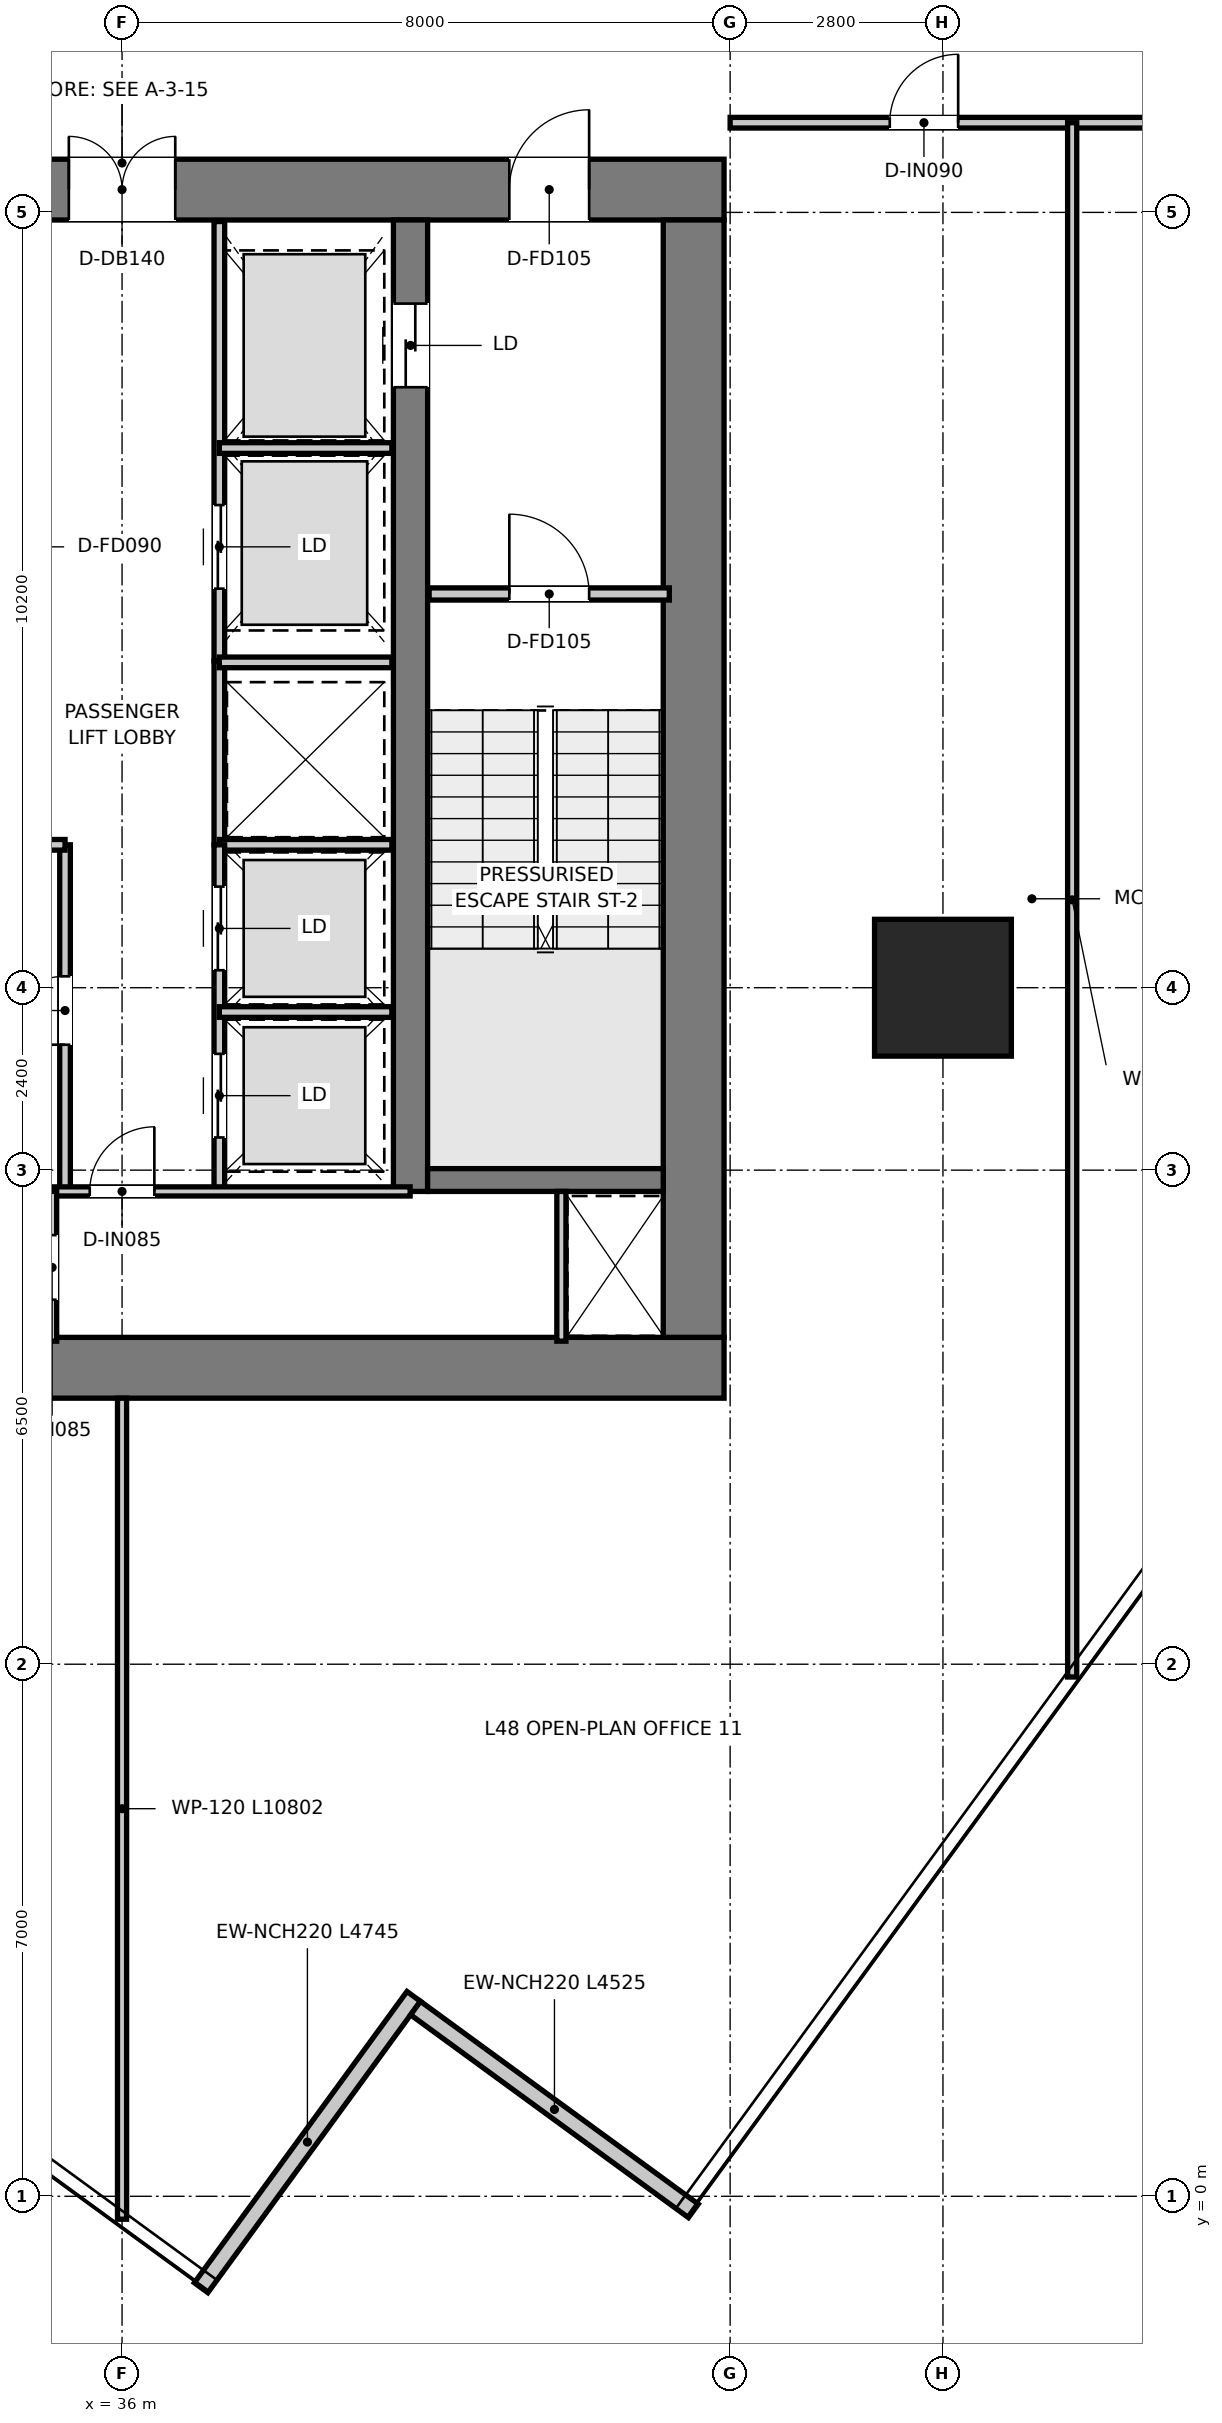
"""IFC4 building model, lengths in metres.
Left out: names, types, materials, properties, quantities, classifications, styles, units other than length and angle.
Written with IfcOpenShell. Run it as: python <this file> out.ifc"""

import sys

from ifc_helpers import new_model, si_unit, direction, frame, frame_2d, origin, origin_2d, place, context, subcontext, project, spatial, rectangle, extrude, source, transform, mapped, element, fill, save


model = new_model("IFC4")
c1 = context("Model", 3, precision=1e-05, world=origin(), true_north=direction((0.0, 1.0)))
c2 = subcontext(c1, "Body", "Model", "MODEL_VIEW")
j1 = project(units=[si_unit("LENGTHUNIT", "METRE"), si_unit("PLANEANGLEUNIT", "RADIAN")], contexts=[c1])
p1 = place(None, origin())
s1 = spatial("IfcSite", under=j1, at=p1, CompositionType="ELEMENT")
p2 = place(p1, origin())
s2 = spatial("IfcBuilding", under=s1, at=p2, CompositionType="ELEMENT")
p3 = place(p2, frame((0.0, 0.0, 197.55)))
s3 = spatial("IfcBuildingStorey", under=s2, at=p3, CompositionType="ELEMENT", Elevation=197.55)
p4 = place(p3, frame((28.08, 10.9, 0.0), z_axis=(0.0, 0.0, 1.0), x_axis=(1.0, 0.0, 0.0)))
e1 = element("IfcWall", 1, at=p4, inside=s3, PredefinedType="SHEAR", context=c2, shape_type="SweptSolid", body=[
    extrude(rectangle(XDim=15.84, YDim=0.8, at=frame_2d((7.92, 0.0))), origin(), (0.0, 0.0, 1.0), 3.95),
])
p5 = place(p3, frame((28.08, 26.4, 0.0), z_axis=(0.0, 0.0, 1.0), x_axis=(1.0, 0.0, 0.0)))
e2 = element("IfcWall", 2, at=p5, inside=s3, PredefinedType="SHEAR", context=c2, shape_type="SweptSolid", body=[
    extrude(rectangle(XDim=15.84, YDim=0.8, at=frame_2d((7.92, 0.0))), origin(), (0.0, 0.0, 1.0), 3.95),
])
p6 = place(p5, frame((7.22, 0.0, 0.0)))
e3 = element("IfcOpeningElement", 3, at=p6, cuts=e2, PredefinedType="OPENING", context=c2, shape_type="SweptSolid", body=[
    extrude(rectangle(XDim=1.4, YDim=2.2, at=frame_2d((0.7, 1.1))), frame((0.0, 0.41, 0.0), z_axis=(0.0, -1.0, 0.0), x_axis=(1.0, 0.0, 0.0)), (0.0, 0.0, 1.0), 0.82),
])
p7 = place(p5, frame((1.775, 0.0, 0.0)))
e4 = element("IfcOpeningElement", 4, at=p7, cuts=e2, PredefinedType="OPENING", context=c2, shape_type="SweptSolid", body=[
    extrude(rectangle(XDim=1.05, YDim=2.1, at=frame_2d((0.525, 1.05))), frame((0.0, 0.41, 0.0), z_axis=(0.0, -1.0, 0.0), x_axis=(1.0, 0.0, 0.0)), (0.0, 0.0, 1.0), 0.82),
])
p8 = place(p5, frame((13.015, 0.0, 0.0)))
e5 = element("IfcOpeningElement", 5, at=p8, cuts=e2, PredefinedType="OPENING", context=c2, shape_type="SweptSolid", body=[
    extrude(rectangle(XDim=1.05, YDim=2.1, at=frame_2d((0.525, 1.05))), frame((0.0, 0.41, 0.0), z_axis=(0.0, -1.0, 0.0), x_axis=(1.0, 0.0, 0.0)), (0.0, 0.0, 1.0), 0.82),
])
p9 = place(p3, frame((43.52, 11.3, 0.0), z_axis=(0.0, 0.0, 1.0), x_axis=(0.0, 1.0, 0.0)))
e6 = element("IfcWall", 6, at=p9, inside=s3, PredefinedType="SHEAR", context=c2, shape_type="SweptSolid", body=[
    extrude(rectangle(XDim=14.7, YDim=0.8, at=frame_2d((7.35, 0.0))), origin(), (0.0, 0.0, 1.0), 3.95),
])
p10 = place(p3, frame((39.795, 13.22, 0.0), z_axis=(0.0, 0.0, 1.0), x_axis=(0.0, 1.0, 0.0)))
e7 = element("IfcWall", 7, at=p10, inside=s3, PredefinedType="SHEAR", context=c2, shape_type="SweptSolid", body=[
    extrude(rectangle(XDim=12.78, YDim=0.45, at=frame_2d((6.39, 0.0))), origin(), (0.0, 0.0, 1.0), 3.95),
])
p11 = place(p10, frame((10.58, 0.0, 0.0)))
e8 = element("IfcOpeningElement", 8, at=p11, cuts=e7, PredefinedType="OPENING", context=c2, shape_type="SweptSolid", body=[
    extrude(rectangle(XDim=1.1, YDim=2.15, at=frame_2d((0.55, 1.075))), frame((0.0, 0.235, 0.0), z_axis=(0.0, -1.0, 0.0), x_axis=(1.0, 0.0, 0.0)), (0.0, 0.0, 1.0), 0.47),
])
p12 = place(p3, frame((40.02, 13.37, 0.0), z_axis=(0.0, 0.0, 1.0), x_axis=(1.0, 0.0, 0.0)))
e9 = element("IfcWall", 9, at=p12, inside=s3, PredefinedType="SHEAR", context=c2, shape_type="SweptSolid", body=[
    extrude(rectangle(XDim=3.1, YDim=0.3, at=frame_2d((1.55, 0.0))), origin(), (0.0, 0.0, 1.0), 3.95),
])
m1 = source(origin(), c2, "Body", "SweptSolid", [
    extrude(rectangle(XDim=1.8, YDim=1.8, at=origin_2d()), origin(), (0.0, 0.0, 1.0), 3.95),
])
p13 = place(p3, frame((46.8, 15.9, 0.0), z_axis=(0.0, 0.0, 1.0), x_axis=(1.0, 0.0, 0.0)))
e10 = element("IfcColumn", 10, at=p13, inside=s3, PredefinedType="USERDEFINED", context=c2, shape_type="MappedRepresentation", body=[
    mapped(m1, transform((0.0, 0.0, 0.0), x_axis=(1.0, 0.0, 0.0), y_axis=(0.0, 1.0, 0.0), z_axis=(0.0, 0.0, 1.0), scale=1.0)),
])
p14 = place(p3, frame((37.04, -1.203, 0.0), z_axis=(0.0, 0.0, 1.0), x_axis=(0.589535308044, 0.807742607871, 0.0)))
e11 = element("IfcWall", 11, at=p14, inside=s3, PredefinedType="ELEMENTEDWALL", context=c2, shape_type="SweptSolid", body=[
    extrude(rectangle(XDim=4.745, YDim=0.22, at=frame_2d((2.373, 0.0))), origin(), (0.0, 0.0, 1.0), 3.59),
])
p15 = place(p3, frame((39.861, 2.476, 0.0), z_axis=(0.0, 0.0, 1.0), x_axis=(0.807734007732, -0.589547091209, 0.0)))
e12 = element("IfcWall", 12, at=p15, inside=s3, PredefinedType="ELEMENTEDWALL", context=c2, shape_type="SweptSolid", body=[
    extrude(rectangle(XDim=4.525, YDim=0.22, at=frame_2d((2.263, 0.0))), origin(), (0.0, 0.0, 1.0), 3.59),
])
p16 = place(p3, frame((40.04, 21.08, 0.0), z_axis=(0.0, 0.0, 1.0), x_axis=(1.0, 0.0, 0.0)))
e13 = element("IfcWall", 13, at=p16, inside=s3, PredefinedType="PARTITIONING", context=c2, shape_type="SweptSolid", body=[
    extrude(rectangle(XDim=3.16, YDim=0.16, at=frame_2d((1.58, 0.0))), origin(), (0.0, 0.0, 1.0), 3.59),
])
p17 = place(p16, frame((1.055, 0.0, 0.0)))
e14 = element("IfcOpeningElement", 14, at=p17, cuts=e13, PredefinedType="OPENING", context=c2, shape_type="SweptSolid", body=[
    extrude(rectangle(XDim=1.05, YDim=2.1, at=frame_2d((0.525, 1.05))), frame((0.0, 0.09, 0.0), z_axis=(0.0, -1.0, 0.0), x_axis=(1.0, 0.0, 0.0)), (0.0, 0.0, 1.0), 0.18),
])
p18 = place(p3, frame((37.28, 20.2, 0.0), z_axis=(0.0, 0.0, 1.0), x_axis=(0.0, 1.0, 0.0)))
e15 = element("IfcWall", 15, at=p18, inside=s3, PredefinedType="PARTITIONING", context=c2, shape_type="SweptSolid", body=[
    extrude(rectangle(XDim=5.78, YDim=0.14, at=frame_2d((2.89, 0.0))), origin(), (0.0, 0.0, 1.0), 2.59),
])
p19 = place(p18, frame((0.95, 0.0, 0.0)))
e16 = element("IfcOpeningElement", 16, at=p19, cuts=e15, PredefinedType="OPENING", context=c2, shape_type="SweptSolid", body=[
    extrude(rectangle(XDim=1.1, YDim=2.15, at=frame_2d((0.55, 1.075))), frame((0.0, 0.08, 0.0), z_axis=(0.0, -1.0, 0.0), x_axis=(1.0, 0.0, 0.0)), (0.0, 0.0, 1.0), 0.16),
])
p20 = place(p3, frame((37.28, 23.0, 0.0), z_axis=(0.0, 0.0, 1.0), x_axis=(1.0, 0.0, 0.0)))
e17 = element("IfcWall", 17, at=p20, inside=s3, PredefinedType="PARTITIONING", context=c2, shape_type="SweptSolid", body=[
    extrude(rectangle(XDim=2.27, YDim=0.14, at=frame_2d((1.135, 0.0))), origin(), (0.0, 0.0, 1.0), 2.59),
])
p21 = place(p3, frame((37.28, 17.78, 0.0), z_axis=(0.0, 0.0, 1.0), x_axis=(0.0, 1.0, 0.0)))
e18 = element("IfcWall", 18, at=p21, inside=s3, PredefinedType="PARTITIONING", context=c2, shape_type="SweptSolid", body=[
    extrude(rectangle(XDim=2.42, YDim=0.14, at=frame_2d((1.21, 0.0))), origin(), (0.0, 0.0, 1.0), 3.59),
])
for number, where, z_axis, x_axis in (
    (19, (37.28, 17.78, 0.0), (0.0, 0.0, 1.0), (1.0, 0.0, 0.0)),
    (20, (37.28, 20.18, 0.0), (0.0, 0.0, 1.0), (1.0, 0.0, 0.0)),
):
    element("IfcWall", number, at=place(p3, frame(where, z_axis=z_axis, x_axis=x_axis)), inside=s3, PredefinedType="PARTITIONING", context=c2, shape_type="SweptSolid", body=[
        extrude(rectangle(XDim=2.27, YDim=0.14, at=frame_2d((1.135, 0.0))), origin(), (0.0, 0.0, 1.0), 3.59),
    ])
p22 = place(p3, frame((35.25, 13.22, 0.0), z_axis=(0.0, 0.0, 1.0), x_axis=(0.0, 1.0, 0.0)))
e21 = element("IfcWall", 21, at=p22, inside=s3, PredefinedType="PARTITIONING", context=c2, shape_type="SweptSolid", body=[
    extrude(rectangle(XDim=4.56, YDim=0.14, at=frame_2d((2.28, 0.0))), origin(), (0.0, 0.0, 1.0), 3.59),
])
p23 = place(p22, frame((1.93, 0.0, 0.0)))
e22 = element("IfcOpeningElement", 22, at=p23, cuts=e21, PredefinedType="OPENING", context=c2, shape_type="SweptSolid", body=[
    extrude(rectangle(XDim=0.9, YDim=2.1, at=frame_2d((0.45, 1.05))), frame((0.0, 0.08, 0.0), z_axis=(0.0, -1.0, 0.0), x_axis=(1.0, 0.0, 0.0)), (0.0, 0.0, 1.0), 0.16),
])
p24 = place(p3, frame((34.72, 17.78, 0.0), z_axis=(0.0, 0.0, 1.0), x_axis=(1.0, 0.0, 0.0)))
e23 = element("IfcWall", 23, at=p24, inside=s3, PredefinedType="PARTITIONING", context=c2, shape_type="SweptSolid", body=[
    extrude(rectangle(XDim=0.53, YDim=0.14, at=frame_2d((0.265, 0.0))), origin(), (0.0, 0.0, 1.0), 3.59),
])
p25 = place(p3, frame((37.28, 13.22, 0.0), z_axis=(0.0, 0.0, 1.0), x_axis=(0.0, 1.0, 0.0)))
e24 = element("IfcWall", 24, at=p25, inside=s3, PredefinedType="PARTITIONING", context=c2, shape_type="SweptSolid", body=[
    extrude(rectangle(XDim=4.56, YDim=0.14, at=frame_2d((2.28, 0.0))), origin(), (0.0, 0.0, 1.0), 3.59),
])
p26 = place(p25, frame((0.71, 0.0, 0.0)))
e25 = element("IfcOpeningElement", 25, at=p26, cuts=e24, PredefinedType="OPENING", context=c2, shape_type="SweptSolid", body=[
    extrude(rectangle(XDim=1.1, YDim=2.15, at=frame_2d((0.55, 1.075))), frame((0.0, 0.08, 0.0), z_axis=(0.0, -1.0, 0.0), x_axis=(1.0, 0.0, 0.0)), (0.0, 0.0, 1.0), 0.16),
])
p27 = place(p25, frame((2.91, 0.0, 0.0)))
e26 = element("IfcOpeningElement", 26, at=p27, cuts=e24, PredefinedType="OPENING", context=c2, shape_type="SweptSolid", body=[
    extrude(rectangle(XDim=1.1, YDim=2.15, at=frame_2d((0.55, 1.075))), frame((0.0, 0.08, 0.0), z_axis=(0.0, -1.0, 0.0), x_axis=(1.0, 0.0, 0.0)), (0.0, 0.0, 1.0), 0.16),
])
p28 = place(p3, frame((37.28, 15.58, 0.0), z_axis=(0.0, 0.0, 1.0), x_axis=(1.0, 0.0, 0.0)))
e27 = element("IfcWall", 27, at=p28, inside=s3, PredefinedType="PARTITIONING", context=c2, shape_type="SweptSolid", body=[
    extrude(rectangle(XDim=2.27, YDim=0.14, at=frame_2d((1.135, 0.0))), origin(), (0.0, 0.0, 1.0), 3.59),
])
p29 = place(p3, frame((41.78, 11.25, 0.0), z_axis=(0.0, 0.0, 1.0), x_axis=(0.0, 1.0, 0.0)))
e28 = element("IfcWall", 28, at=p29, inside=s3, PredefinedType="PARTITIONING", context=c2, shape_type="SweptSolid", body=[
    extrude(rectangle(XDim=1.97, YDim=0.12, at=frame_2d((0.985, 0.0))), origin(), (0.0, 0.0, 1.0), 3.59),
])
p30 = place(p3, frame((32.21, 13.22, 0.0), z_axis=(0.0, 0.0, 1.0), x_axis=(1.0, 0.0, 0.0)))
e29 = element("IfcWall", 29, at=p30, inside=s3, PredefinedType="PARTITIONING", context=c2, shape_type="SweptSolid", body=[
    extrude(rectangle(XDim=7.58, YDim=0.12, at=frame_2d((3.79, 0.0))), origin(), (0.0, 0.0, 1.0), 3.59),
])
p31 = place(p30, frame((3.365, 0.0, 0.0)))
e30 = element("IfcOpeningElement", 30, at=p31, cuts=e29, PredefinedType="OPENING", context=c2, shape_type="SweptSolid", body=[
    extrude(rectangle(XDim=0.85, YDim=2.1, at=frame_2d((0.425, 1.05))), frame((0.0, 0.07, 0.0), z_axis=(0.0, -1.0, 0.0), x_axis=(1.0, 0.0, 0.0)), (0.0, 0.0, 1.0), 0.14),
])
p32 = place(p3, frame((35.08, 11.25, 0.0), z_axis=(0.0, 0.0, 1.0), x_axis=(0.0, 1.0, 0.0)))
e31 = element("IfcWall", 31, at=p32, inside=s3, PredefinedType="PARTITIONING", context=c2, shape_type="SweptSolid", body=[
    extrude(rectangle(XDim=1.97, YDim=0.12, at=frame_2d((0.985, 0.0))), origin(), (0.0, 0.0, 1.0), 3.59),
])
p33 = place(p32, frame((0.545, 0.0, 0.0)))
e32 = element("IfcOpeningElement", 32, at=p33, cuts=e31, PredefinedType="OPENING", context=c2, shape_type="SweptSolid", body=[
    extrude(rectangle(XDim=0.85, YDim=2.1, at=frame_2d((0.425, 1.05))), frame((0.0, 0.07, 0.0), z_axis=(0.0, -1.0, 0.0), x_axis=(1.0, 0.0, 0.0)), (0.0, 0.0, 1.0), 0.14),
])
p34 = place(p3, frame((44.0, 27.28, 0.0), z_axis=(0.0, 0.0, 1.0), x_axis=(1.0, 0.0, 0.0)))
e33 = element("IfcWall", 33, at=p34, inside=s3, PredefinedType="PARTITIONING", context=c2, shape_type="SweptSolid", body=[
    extrude(rectangle(XDim=19.425, YDim=0.14, at=frame_2d((9.712, 0.0))), origin(), (0.0, 0.0, 1.0), 2.95),
])
p35 = place(p34, frame((2.1, 0.0, 0.0)))
e34 = element("IfcOpeningElement", 34, at=p35, cuts=e33, PredefinedType="OPENING", context=c2, shape_type="SweptSolid", body=[
    extrude(rectangle(XDim=0.9, YDim=2.1, at=frame_2d((0.45, 1.05))), frame((0.0, 0.08, 0.0), z_axis=(0.0, -1.0, 0.0), x_axis=(1.0, 0.0, 0.0)), (0.0, 0.0, 1.0), 0.16),
])
p36 = place(p34, frame((11.22, 0.0, 0.0)))
e35 = element("IfcOpeningElement", 35, at=p36, cuts=e33, PredefinedType="OPENING", context=c2, shape_type="SweptSolid", body=[
    extrude(rectangle(XDim=0.9, YDim=2.1, at=frame_2d((0.45, 1.05))), frame((0.0, 0.08, 0.0), z_axis=(0.0, -1.0, 0.0), x_axis=(1.0, 0.0, 0.0)), (0.0, 0.0, 1.0), 0.16),
])
p37 = place(p3, frame((36.0, -0.302, 0.0), z_axis=(0.0, 0.0, 1.0), x_axis=(0.0, 1.0, 0.0)))
e36 = element("IfcWall", 36, at=p37, inside=s3, PredefinedType="PARTITIONING", context=c2, shape_type="SweptSolid", body=[
    extrude(rectangle(XDim=10.802, YDim=0.12, at=frame_2d((5.401, 0.0))), origin(), (0.0, 0.0, 1.0), 3.59),
])
p38 = place(p3, frame((48.5, 6.832, 0.0), z_axis=(0.0, 0.0, 1.0), x_axis=(0.0, 1.0, 0.0)))
e37 = element("IfcWall", 37, at=p38, inside=s3, PredefinedType="PARTITIONING", context=c2, shape_type="SweptSolid", body=[
    extrude(rectangle(XDim=20.448, YDim=0.12, at=frame_2d((10.224, 0.0))), origin(), (0.0, 0.0, 1.0), 3.0),
])
p39 = place(p17, origin())
e38 = element("IfcDoor", 38, at=p39, inside=s3, OperationType="SINGLE_SWING_LEFT", PredefinedType="DOOR", context=c2, shape_type="SweptSolid", body=[
    extrude(rectangle(XDim=1.05, YDim=2.1, at=frame_2d((0.525, 1.05))), frame((0.0, 0.025, 0.0), z_axis=(0.0, -1.0, 0.0), x_axis=(1.0, 0.0, 0.0)), (0.0, 0.0, 1.0), 0.05),
])
fill(e14, e38)
p40 = place(p6, origin())
e39 = element("IfcDoor", 39, at=p40, inside=s3, OperationType="DOUBLE_DOOR_SINGLE_SWING", PredefinedType="DOOR", context=c2, shape_type="SweptSolid", body=[
    extrude(rectangle(XDim=1.4, YDim=2.2, at=frame_2d((0.7, 1.1))), frame((0.0, 0.025, 0.0), z_axis=(0.0, -1.0, 0.0), x_axis=(1.0, 0.0, 0.0)), (0.0, 0.0, 1.0), 0.05),
])
fill(e3, e39)
p41 = place(p8, origin())
e40 = element("IfcDoor", 40, at=p41, inside=s3, OperationType="SINGLE_SWING_RIGHT", PredefinedType="DOOR", context=c2, shape_type="SweptSolid", body=[
    extrude(rectangle(XDim=1.05, YDim=2.1, at=frame_2d((0.525, 1.05))), frame((0.0, 0.025, 0.0), z_axis=(0.0, -1.0, 0.0), x_axis=(1.0, 0.0, 0.0)), (0.0, 0.0, 1.0), 0.05),
])
fill(e5, e40)
p42 = place(p11, origin())
e41 = element("IfcDoor", 41, at=p42, inside=s3, OperationType="DOUBLE_DOOR_SLIDING", PredefinedType="DOOR", context=c2, shape_type="SweptSolid", body=[
    extrude(rectangle(XDim=1.1, YDim=2.15, at=frame_2d((0.55, 1.075))), frame((0.0, 0.025, 0.0), z_axis=(0.0, -1.0, 0.0), x_axis=(1.0, 0.0, 0.0)), (0.0, 0.0, 1.0), 0.05),
])
fill(e8, e41)
p43 = place(p19, origin())
e42 = element("IfcDoor", 42, at=p43, inside=s3, OperationType="DOUBLE_DOOR_SLIDING", PredefinedType="DOOR", context=c2, shape_type="SweptSolid", body=[
    extrude(rectangle(XDim=1.1, YDim=2.15, at=frame_2d((0.55, 1.075))), frame((0.0, 0.025, 0.0), z_axis=(0.0, -1.0, 0.0), x_axis=(1.0, 0.0, 0.0)), (0.0, 0.0, 1.0), 0.05),
])
fill(e16, e42)
p44 = place(p23, origin())
e43 = element("IfcDoor", 43, at=p44, inside=s3, OperationType="SINGLE_SWING_LEFT", PredefinedType="DOOR", context=c2, shape_type="SweptSolid", body=[
    extrude(rectangle(XDim=0.9, YDim=2.1, at=frame_2d((0.45, 1.05))), frame((0.0, 0.025, 0.0), z_axis=(0.0, -1.0, 0.0), x_axis=(1.0, 0.0, 0.0)), (0.0, 0.0, 1.0), 0.05),
])
fill(e22, e43)
p45 = place(p26, origin())
e44 = element("IfcDoor", 44, at=p45, inside=s3, OperationType="DOUBLE_DOOR_SLIDING", PredefinedType="DOOR", context=c2, shape_type="SweptSolid", body=[
    extrude(rectangle(XDim=1.1, YDim=2.15, at=frame_2d((0.55, 1.075))), frame((0.0, 0.025, 0.0), z_axis=(0.0, -1.0, 0.0), x_axis=(1.0, 0.0, 0.0)), (0.0, 0.0, 1.0), 0.05),
])
fill(e25, e44)
p46 = place(p27, origin())
e45 = element("IfcDoor", 45, at=p46, inside=s3, OperationType="DOUBLE_DOOR_SLIDING", PredefinedType="DOOR", context=c2, shape_type="SweptSolid", body=[
    extrude(rectangle(XDim=1.1, YDim=2.15, at=frame_2d((0.55, 1.075))), frame((0.0, 0.025, 0.0), z_axis=(0.0, -1.0, 0.0), x_axis=(1.0, 0.0, 0.0)), (0.0, 0.0, 1.0), 0.05),
])
fill(e26, e45)
p47 = place(p31, origin())
e46 = element("IfcDoor", 46, at=p47, inside=s3, OperationType="SINGLE_SWING_RIGHT", PredefinedType="DOOR", context=c2, shape_type="SweptSolid", body=[
    extrude(rectangle(XDim=0.85, YDim=2.1, at=frame_2d((0.425, 1.05))), frame((0.0, 0.025, 0.0), z_axis=(0.0, -1.0, 0.0), x_axis=(1.0, 0.0, 0.0)), (0.0, 0.0, 1.0), 0.05),
])
fill(e30, e46)
p48 = place(p33, origin())
e47 = element("IfcDoor", 47, at=p48, inside=s3, OperationType="SINGLE_SWING_LEFT", PredefinedType="DOOR", context=c2, shape_type="SweptSolid", body=[
    extrude(rectangle(XDim=0.85, YDim=2.1, at=frame_2d((0.425, 1.05))), frame((0.0, 0.025, 0.0), z_axis=(0.0, -1.0, 0.0), x_axis=(1.0, 0.0, 0.0)), (0.0, 0.0, 1.0), 0.05),
])
fill(e32, e47)
p49 = place(p35, origin())
e48 = element("IfcDoor", 48, at=p49, inside=s3, OperationType="SINGLE_SWING_RIGHT", PredefinedType="DOOR", context=c2, shape_type="SweptSolid", body=[
    extrude(rectangle(XDim=0.9, YDim=2.1, at=frame_2d((0.45, 1.05))), frame((0.0, 0.025, 0.0), z_axis=(0.0, -1.0, 0.0), x_axis=(1.0, 0.0, 0.0)), (0.0, 0.0, 1.0), 0.05),
])
fill(e34, e48)
save(model, sys.argv[1])
